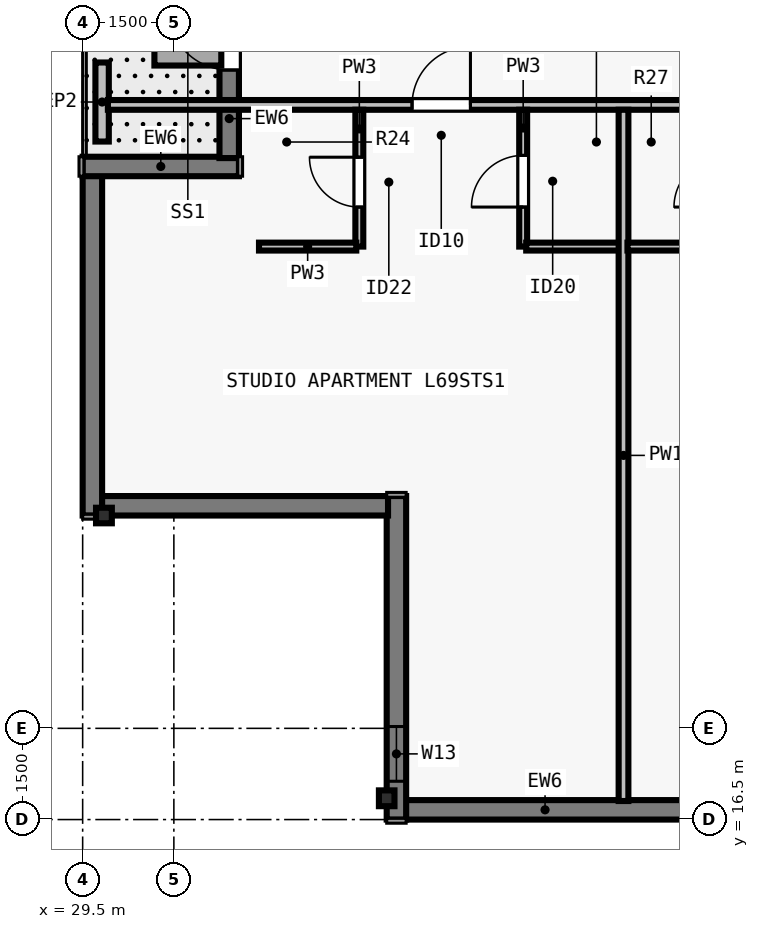
"""IFC4 building model, lengths in metres.
Left out: names, types, materials, properties, quantities, classifications, styles, units other than length and angle.
Written with IfcOpenShell. Run it as: python <this file> out.ifc"""

import sys

from ifc_helpers import new_model, si_unit, direction, frame, frame_2d, origin, origin_2d, place, context, subcontext, project, spatial, rectangle, i_section, extrude, element, fill, save


model = new_model("IFC4")
c1 = context("Model", 3, precision=1e-05, world=origin(), true_north=direction((0.0, 1.0)))
c2 = subcontext(c1, "Body", "Model", "MODEL_VIEW")
j1 = project(units=[si_unit("LENGTHUNIT", "METRE"), si_unit("PLANEANGLEUNIT", "RADIAN")], contexts=[c1])
p1 = place(None, origin())
s1 = spatial("IfcSite", under=j1, at=p1, CompositionType="ELEMENT")
p2 = place(p1, origin())
s2 = spatial("IfcBuilding", under=s1, at=p2, CompositionType="ELEMENT")
p3 = place(p2, frame((0.0, 0.0, 251.5)))
s3 = spatial("IfcBuildingStorey", under=s2, at=p3, CompositionType="ELEMENT", Elevation=251.5)
for number, where, z_axis, x_axis in (
    (1, (34.5, 16.85, 0.0), (0.0, 0.0, 1.0), (1.0, 0.0, 0.0)),
    (2, (29.85, 21.5, 0.0), (0.0, 0.0, 1.0), (0.0, 1.0, 0.0)),
):
    element("IfcColumn", number, at=place(p3, frame(where, z_axis=z_axis, x_axis=x_axis)), inside=s3, PredefinedType="COLUMN", context=c2, shape_type="SweptSolid", body=[
        extrude(i_section(OverallWidth=0.256, OverallDepth=0.26, WebThickness=0.01, FlangeThickness=0.017, FilletRadius=0.013, at=origin_2d()), origin(), (0.0, 0.0, 1.0), 3.5),
    ])
p4 = place(p3, frame((69.5, 16.66, 0.0), z_axis=(0.0, 0.0, 1.0), x_axis=(-1.0, 0.0, 0.0)))
e3 = element("IfcWall", 3, at=p4, inside=s3, PredefinedType="SOLIDWALL", context=c2, shape_type="SweptSolid", body=[
    extrude(rectangle(XDim=34.702, YDim=0.32, at=frame_2d((17.351, 0.0))), origin(), (0.0, 0.0, 1.0), 3.29),
])
p5 = place(p4, frame((4.613, 0.0, 0.8)))
e4 = element("IfcOpeningElement", 4, at=p5, cuts=e3, PredefinedType="OPENING", context=c2, shape_type="SweptSolid", body=[
    extrude(rectangle(XDim=1.85, YDim=1.678, at=frame_2d((0.925, 0.839))), frame((0.0, 0.17, 0.0), z_axis=(0.0, -1.0, 0.0), x_axis=(1.0, 0.0, 0.0)), (0.0, 0.0, 1.0), 0.34),
])
p6 = place(p4, frame((8.138, 0.0, 0.8)))
e5 = element("IfcOpeningElement", 5, at=p6, cuts=e3, PredefinedType="OPENING", context=c2, shape_type="SweptSolid", body=[
    extrude(rectangle(XDim=1.55, YDim=1.678, at=frame_2d((0.775, 0.839))), frame((0.0, 0.17, 0.0), z_axis=(0.0, -1.0, 0.0), x_axis=(1.0, 0.0, 0.0)), (0.0, 0.0, 1.0), 0.34),
])
p7 = place(p4, frame((10.113, 0.0, 0.8)))
e6 = element("IfcOpeningElement", 6, at=p7, cuts=e3, PredefinedType="OPENING", context=c2, shape_type="SweptSolid", body=[
    extrude(rectangle(XDim=1.85, YDim=1.678, at=frame_2d((0.925, 0.839))), frame((0.0, 0.17, 0.0), z_axis=(0.0, -1.0, 0.0), x_axis=(1.0, 0.0, 0.0)), (0.0, 0.0, 1.0), 0.34),
])
p8 = place(p4, frame((14.888, 0.0, 0.8)))
e7 = element("IfcOpeningElement", 7, at=p8, cuts=e3, PredefinedType="OPENING", context=c2, shape_type="SweptSolid", body=[
    extrude(rectangle(XDim=1.55, YDim=1.678, at=frame_2d((0.775, 0.839))), frame((0.0, 0.17, 0.0), z_axis=(0.0, -1.0, 0.0), x_axis=(1.0, 0.0, 0.0)), (0.0, 0.0, 1.0), 0.34),
])
p9 = place(p4, frame((18.114, 0.0, 0.8)))
e8 = element("IfcOpeningElement", 8, at=p9, cuts=e3, PredefinedType="OPENING", context=c2, shape_type="SweptSolid", body=[
    extrude(rectangle(XDim=1.85, YDim=1.678, at=frame_2d((0.925, 0.839))), frame((0.0, 0.17, 0.0), z_axis=(0.0, -1.0, 0.0), x_axis=(1.0, 0.0, 0.0)), (0.0, 0.0, 1.0), 0.34),
])
p10 = place(p4, frame((24.864, 0.0, 0.8)))
e9 = element("IfcOpeningElement", 9, at=p10, cuts=e3, PredefinedType="OPENING", context=c2, shape_type="SweptSolid", body=[
    extrude(rectangle(XDim=1.85, YDim=1.678, at=frame_2d((0.925, 0.839))), frame((0.0, 0.17, 0.0), z_axis=(0.0, -1.0, 0.0), x_axis=(1.0, 0.0, 0.0)), (0.0, 0.0, 1.0), 0.34),
])
p11 = place(p4, frame((28.389, 0.0, 0.8)))
e10 = element("IfcOpeningElement", 10, at=p11, cuts=e3, PredefinedType="OPENING", context=c2, shape_type="SweptSolid", body=[
    extrude(rectangle(XDim=1.55, YDim=1.678, at=frame_2d((0.775, 0.839))), frame((0.0, 0.17, 0.0), z_axis=(0.0, -1.0, 0.0), x_axis=(1.0, 0.0, 0.0)), (0.0, 0.0, 1.0), 0.34),
])
p12 = place(p3, frame((34.66, 16.5, 0.0), z_axis=(0.0, 0.0, 1.0), x_axis=(0.0, 1.0, 0.0)))
e11 = element("IfcWall", 11, at=p12, inside=s3, PredefinedType="SOLIDWALL", context=c2, shape_type="SweptSolid", body=[
    extrude(rectangle(XDim=5.32, YDim=0.32, at=frame_2d((2.66, 0.0))), origin(), (0.0, 0.0, 1.0), 3.29),
])
p13 = place(p12, frame((0.63, 0.0, 0.8)))
e12 = element("IfcOpeningElement", 12, at=p13, cuts=e11, PredefinedType="OPENING", context=c2, shape_type="SweptSolid", body=[
    extrude(rectangle(XDim=0.9, YDim=1.678, at=frame_2d((0.45, 0.839))), frame((0.0, 0.17, 0.0), z_axis=(0.0, -1.0, 0.0), x_axis=(1.0, 0.0, 0.0)), (0.0, 0.0, 1.0), 0.34),
])
p14 = place(p3, frame((34.522, 21.66, 0.0), z_axis=(0.0, 0.0, 1.0), x_axis=(-1.0, 0.0, 0.0)))
e13 = element("IfcWall", 13, at=p14, inside=s3, PredefinedType="SOLIDWALL", context=c2, shape_type="SweptSolid", body=[
    extrude(rectangle(XDim=4.724, YDim=0.32, at=frame_2d((2.362, 0.0))), origin(), (0.0, 0.0, 1.0), 3.29),
])
p15 = place(p3, frame((29.66, 21.5, 0.0), z_axis=(0.0, 0.0, 1.0), x_axis=(0.0, 1.0, 0.0)))
e14 = element("IfcWall", 14, at=p15, inside=s3, PredefinedType="SOLIDWALL", context=c2, shape_type="SweptSolid", body=[
    extrude(rectangle(XDim=5.602, YDim=0.32, at=frame_2d((2.801, 0.0))), origin(), (0.0, 0.0, 1.0), 3.29),
])
p16 = place(p3, frame((29.5, 27.24, 0.0), z_axis=(0.0, 0.0, 1.0), x_axis=(1.0, 0.0, 0.0)))
e15 = element("IfcWall", 15, at=p16, inside=s3, PredefinedType="SOLIDWALL", context=c2, shape_type="SweptSolid", body=[
    extrude(rectangle(XDim=2.57, YDim=0.32, at=frame_2d((1.285, 0.0))), origin(), (0.0, 0.0, 1.0), 3.29),
])
p17 = place(p3, frame((31.91, 27.378, 0.0), z_axis=(0.0, 0.0, 1.0), x_axis=(0.0, 1.0, 0.0)))
e16 = element("IfcWall", 16, at=p17, inside=s3, PredefinedType="SOLIDWALL", context=c2, shape_type="SweptSolid", body=[
    extrude(rectangle(XDim=5.742, YDim=0.32, at=frame_2d((2.871, 0.0))), origin(), (0.0, 0.0, 1.0), 3.29),
])
p18 = place(p17, frame((1.448, 0.0, 0.0)))
e17 = element("IfcOpeningElement", 17, at=p18, cuts=e16, PredefinedType="OPENING", context=c2, shape_type="SweptSolid", body=[
    extrude(rectangle(XDim=1.0, YDim=2.15, at=frame_2d((0.5, 1.075))), frame((0.0, 0.17, 0.0), z_axis=(0.0, -1.0, 0.0), x_axis=(1.0, 0.0, 0.0)), (0.0, 0.0, 1.0), 0.34),
])
p19 = place(p17, frame((3.43, 0.0, 0.8)))
e18 = element("IfcOpeningElement", 18, at=p19, cuts=e16, PredefinedType="OPENING", context=c2, shape_type="SweptSolid", body=[
    extrude(rectangle(XDim=0.9, YDim=1.678, at=frame_2d((0.45, 0.839))), frame((0.0, 0.17, 0.0), z_axis=(0.0, -1.0, 0.0), x_axis=(1.0, 0.0, 0.0)), (0.0, 0.0, 1.0), 0.34),
])
p20 = place(p3, frame((29.82, 27.65, 0.0), z_axis=(0.0, 0.0, 1.0), x_axis=(0.0, 1.0, 0.0)))
e19 = element("IfcWall", 19, at=p20, inside=s3, PredefinedType="PARAPET", context=c2, shape_type="SweptSolid", body=[
    extrude(rectangle(XDim=1.3, YDim=0.22, at=frame_2d((0.65, 0.0))), origin(), (0.0, 0.0, 1.0), 0.55),
])
p21 = place(p3, frame((29.915, 28.252, 0.0), z_axis=(0.0, 0.0, 1.0), x_axis=(1.0, 0.0, 0.0)))
e20 = element("IfcWall", 20, at=p21, inside=s3, PredefinedType="PARTITIONING", context=c2, shape_type="SweptSolid", body=[
    extrude(rectangle(XDim=44.28, YDim=0.16, at=frame_2d((22.14, 0.0))), origin(), (0.0, 0.0, 1.0), 2.958),
])
p22 = place(p21, frame((5.002, 0.0, 0.0)))
e21 = element("IfcOpeningElement", 21, at=p22, cuts=e20, PredefinedType="OPENING", context=c2, shape_type="SweptSolid", body=[
    extrude(rectangle(XDim=0.96, YDim=2.18, at=frame_2d((0.48, 1.09))), frame((0.0, 0.09, 0.0), z_axis=(0.0, -1.0, 0.0), x_axis=(1.0, 0.0, 0.0)), (0.0, 0.0, 1.0), 0.18),
])
p23 = place(p21, frame((12.718, 0.0, 0.0)))
e22 = element("IfcOpeningElement", 22, at=p23, cuts=e20, PredefinedType="OPENING", context=c2, shape_type="SweptSolid", body=[
    extrude(rectangle(XDim=0.96, YDim=2.18, at=frame_2d((0.48, 1.09))), frame((0.0, 0.09, 0.0), z_axis=(0.0, -1.0, 0.0), x_axis=(1.0, 0.0, 0.0)), (0.0, 0.0, 1.0), 0.18),
])
p24 = place(p21, frame((21.55, 0.0, 0.0)))
e23 = element("IfcOpeningElement", 23, at=p24, cuts=e20, PredefinedType="OPENING", context=c2, shape_type="SweptSolid", body=[
    extrude(rectangle(XDim=0.96, YDim=2.18, at=frame_2d((0.48, 1.09))), frame((0.0, 0.09, 0.0), z_axis=(0.0, -1.0, 0.0), x_axis=(1.0, 0.0, 0.0)), (0.0, 0.0, 1.0), 0.18),
])
p25 = place(p21, frame((30.382, 0.0, 0.0)))
e24 = element("IfcOpeningElement", 24, at=p25, cuts=e20, PredefinedType="OPENING", context=c2, shape_type="SweptSolid", body=[
    extrude(rectangle(XDim=0.96, YDim=2.18, at=frame_2d((0.48, 1.09))), frame((0.0, 0.09, 0.0), z_axis=(0.0, -1.0, 0.0), x_axis=(1.0, 0.0, 0.0)), (0.0, 0.0, 1.0), 0.18),
])
p26 = place(p21, frame((39.393, 0.0, 0.0)))
e25 = element("IfcOpeningElement", 25, at=p26, cuts=e20, PredefinedType="OPENING", context=c2, shape_type="SweptSolid", body=[
    extrude(rectangle(XDim=0.96, YDim=2.18, at=frame_2d((0.48, 1.09))), frame((0.0, 0.09, 0.0), z_axis=(0.0, -1.0, 0.0), x_axis=(1.0, 0.0, 0.0)), (0.0, 0.0, 1.0), 0.18),
])
p27 = place(p3, frame((34.05, 25.923, 0.0), z_axis=(0.0, 0.0, 1.0), x_axis=(0.0, 1.0, 0.0)))
e26 = element("IfcWall", 26, at=p27, inside=s3, PredefinedType="PLUMBINGWALL", context=c2, shape_type="SweptSolid", body=[
    extrude(rectangle(XDim=2.25, YDim=0.13, at=frame_2d((1.125, 0.0))), origin(), (0.0, 0.0, 1.0), 3.29),
])
p28 = place(p27, frame((0.65, 0.0, 0.0)))
e27 = element("IfcOpeningElement", 27, at=p28, cuts=e26, PredefinedType="OPENING", context=c2, shape_type="SweptSolid", body=[
    extrude(rectangle(XDim=0.82, YDim=2.1, at=frame_2d((0.41, 1.05))), frame((0.0, 0.075, 0.0), z_axis=(0.0, -1.0, 0.0), x_axis=(1.0, 0.0, 0.0)), (0.0, 0.0, 1.0), 0.15),
])
p29 = place(p3, frame((32.4, 25.923, 0.0), z_axis=(0.0, 0.0, 1.0), x_axis=(1.0, 0.0, 0.0)))
e28 = element("IfcWall", 28, at=p29, inside=s3, PredefinedType="PLUMBINGWALL", context=c2, shape_type="SweptSolid", body=[
    extrude(rectangle(XDim=1.6, YDim=0.13, at=frame_2d((0.8, 0.0))), origin(), (0.0, 0.0, 1.0), 3.29),
])
p30 = place(p3, frame((36.744, 25.923, 0.0), z_axis=(0.0, 0.0, 1.0), x_axis=(0.0, 1.0, 0.0)))
e29 = element("IfcWall", 29, at=p30, inside=s3, PredefinedType="PLUMBINGWALL", context=c2, shape_type="SweptSolid", body=[
    extrude(rectangle(XDim=2.25, YDim=0.13, at=frame_2d((1.125, 0.0))), origin(), (0.0, 0.0, 1.0), 3.29),
])
p31 = place(p30, frame((0.65, 0.0, 0.0)))
e30 = element("IfcOpeningElement", 30, at=p31, cuts=e29, PredefinedType="OPENING", context=c2, shape_type="SweptSolid", body=[
    extrude(rectangle(XDim=0.85, YDim=2.1, at=frame_2d((0.425, 1.05))), frame((0.0, 0.075, 0.0), z_axis=(0.0, -1.0, 0.0), x_axis=(1.0, 0.0, 0.0)), (0.0, 0.0, 1.0), 0.15),
])
p32 = place(p3, frame((36.794, 25.923, 0.0), z_axis=(0.0, 0.0, 1.0), x_axis=(1.0, 0.0, 0.0)))
e31 = element("IfcWall", 31, at=p32, inside=s3, PredefinedType="PLUMBINGWALL", context=c2, shape_type="SweptSolid", body=[
    extrude(rectangle(XDim=1.6, YDim=0.13, at=frame_2d((0.8, 0.0))), origin(), (0.0, 0.0, 1.0), 3.29),
])
p33 = place(p3, frame((38.395, 16.805, 0.0), z_axis=(0.0, 0.0, 1.0), x_axis=(0.0, 1.0, 0.0)))
e32 = element("IfcWall", 32, at=p33, inside=s3, PredefinedType="PARTITIONING", context=c2, shape_type="SweptSolid", body=[
    extrude(rectangle(XDim=11.368, YDim=0.16, at=frame_2d((5.684, 0.0))), origin(), (0.0, 0.0, 1.0), 2.573),
])
p34 = place(p3, frame((38.459, 25.923, 0.0), z_axis=(0.0, 0.0, 1.0), x_axis=(1.0, 0.0, 0.0)))
e33 = element("IfcWall", 33, at=p34, inside=s3, PredefinedType="PLUMBINGWALL", context=c2, shape_type="SweptSolid", body=[
    extrude(rectangle(XDim=1.535, YDim=0.13, at=frame_2d((0.768, 0.0))), origin(), (0.0, 0.0, 1.0), 3.29),
])
p35 = place(p18, origin())
e34 = element("IfcDoor", 34, at=p35, inside=s3, OperationType="SINGLE_SWING_RIGHT", PredefinedType="DOOR", context=c2, shape_type="SweptSolid", body=[
    extrude(rectangle(XDim=1.0, YDim=2.15, at=frame_2d((0.5, 1.075))), frame((0.0, 0.025, 0.0), z_axis=(0.0, -1.0, 0.0), x_axis=(1.0, 0.0, 0.0)), (0.0, 0.0, 1.0), 0.05),
])
fill(e17, e34)
p36 = place(p13, origin())
e35 = element("IfcWindow", 35, at=p36, inside=s3, PartitioningType="SINGLE_PANEL", PredefinedType="WINDOW", context=c2, shape_type="SweptSolid", body=[
    extrude(rectangle(XDim=0.9, YDim=1.678, at=frame_2d((0.45, 0.839))), frame((0.0, -0.04, 0.0), z_axis=(0.0, -1.0, 0.0), x_axis=(1.0, 0.0, 0.0)), (0.0, 0.0, 1.0), 0.06),
])
fill(e12, e35)
p37 = place(p28, origin())
e36 = element("IfcDoor", 36, at=p37, inside=s3, OperationType="SINGLE_SWING_RIGHT", PredefinedType="DOOR", context=c2, shape_type="SweptSolid", body=[
    extrude(rectangle(XDim=0.82, YDim=2.1, at=frame_2d((0.41, 1.05))), frame((0.0, 0.025, 0.0), z_axis=(0.0, -1.0, 0.0), x_axis=(1.0, 0.0, 0.0)), (0.0, 0.0, 1.0), 0.05),
])
fill(e27, e36)
p38 = place(p31, origin())
e37 = element("IfcDoor", 37, at=p38, inside=s3, OperationType="SINGLE_SWING_LEFT", PredefinedType="DOOR", context=c2, shape_type="SweptSolid", body=[
    extrude(rectangle(XDim=0.85, YDim=2.1, at=frame_2d((0.425, 1.05))), frame((0.0, 0.025, 0.0), z_axis=(0.0, -1.0, 0.0), x_axis=(1.0, 0.0, 0.0)), (0.0, 0.0, 1.0), 0.05),
])
fill(e30, e37)
p39 = place(p22, origin())
e38 = element("IfcDoor", 38, at=p39, inside=s3, OperationType="SINGLE_SWING_RIGHT", PredefinedType="DOOR", context=c2, shape_type="SweptSolid", body=[
    extrude(rectangle(XDim=0.96, YDim=2.18, at=frame_2d((0.48, 1.09))), frame((0.0, 0.025, 0.0), z_axis=(0.0, -1.0, 0.0), x_axis=(1.0, 0.0, 0.0)), (0.0, 0.0, 1.0), 0.05),
])
fill(e21, e38)
save(model, sys.argv[1])
